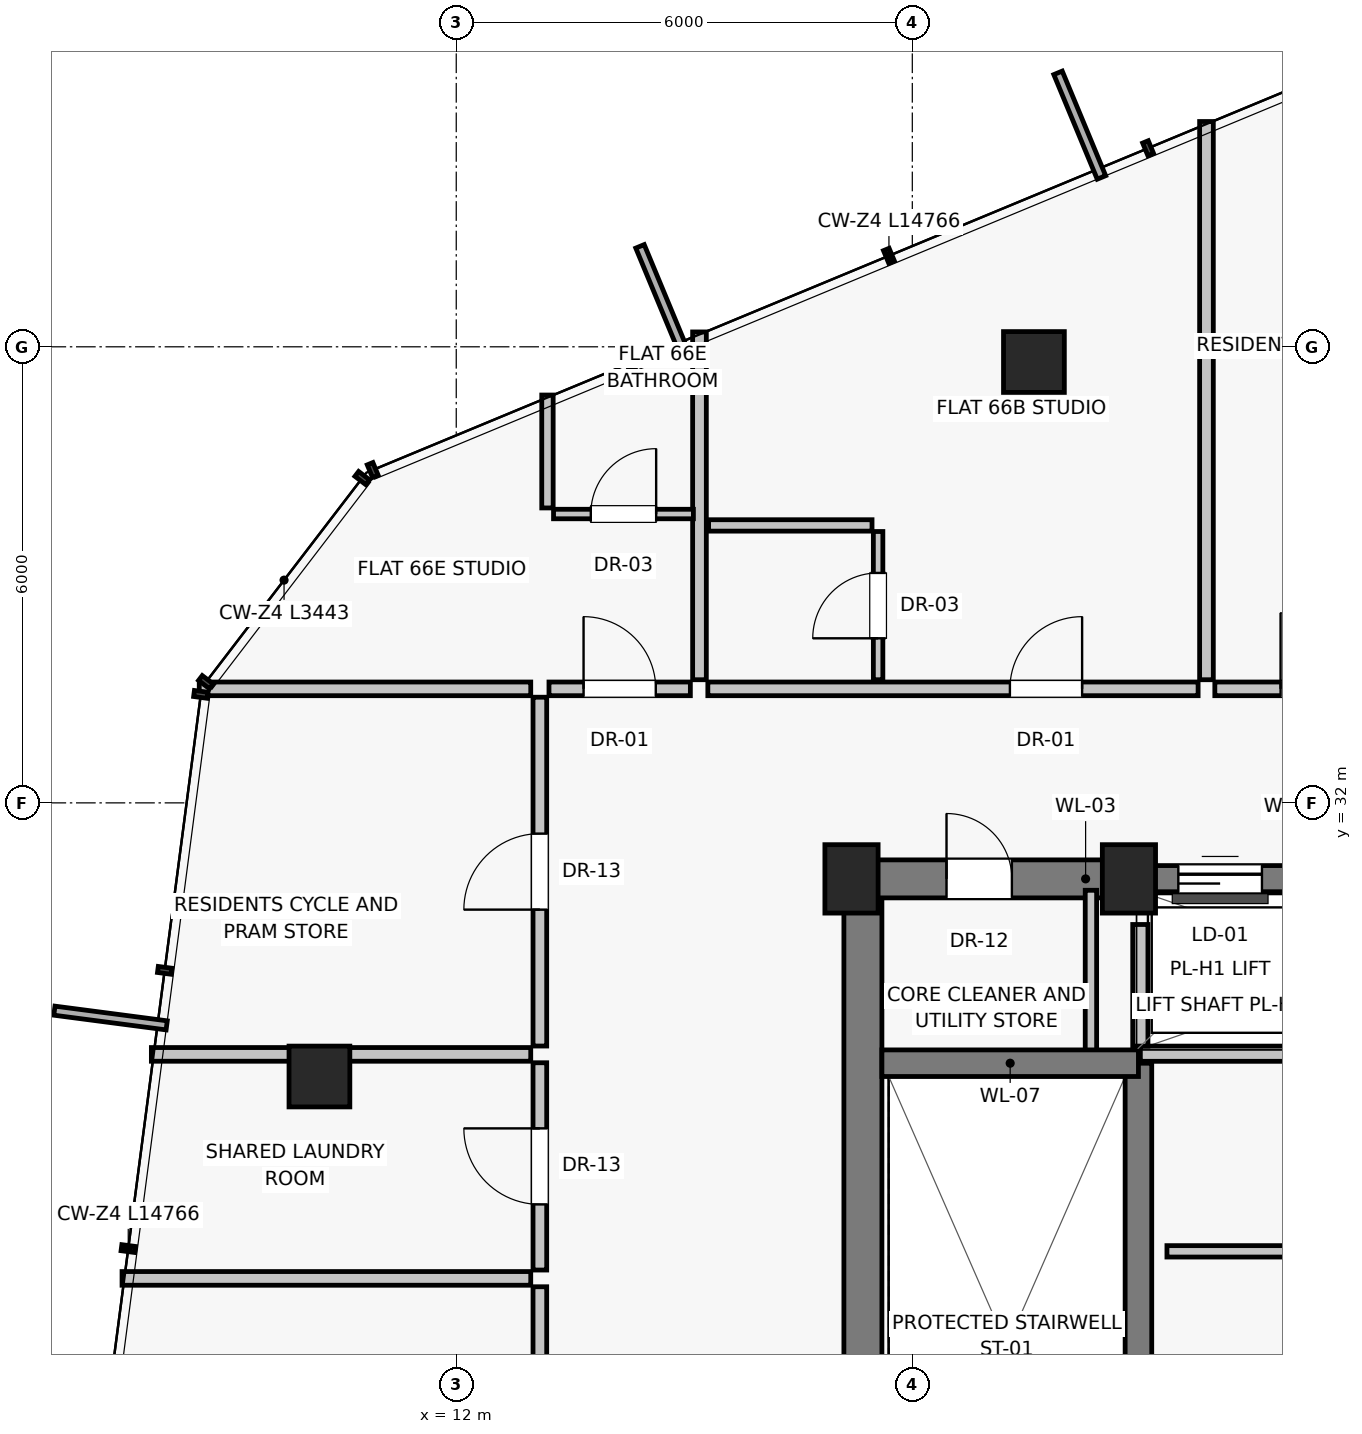
"""IFC4 building model, lengths in metres.
Left out: names, types, materials, properties, quantities, classifications, styles, units other than length and angle.
Written with IfcOpenShell. Run it as: python <this file> out.ifc"""

import sys

from ifc_helpers import new_model, si_unit, direction, frame, frame_2d, origin, origin_2d, place, context, subcontext, project, spatial, rectangle, extrude, source, transform, mapped, element, fill, save


model = new_model("IFC4")
c1 = context("Model", 3, precision=1e-05, world=origin(), true_north=direction((0.0, 1.0)))
c2 = subcontext(c1, "Body", "Model", "MODEL_VIEW")
j1 = project(units=[si_unit("LENGTHUNIT", "METRE"), si_unit("PLANEANGLEUNIT", "RADIAN")], contexts=[c1])
p1 = place(None, origin())
s1 = spatial("IfcSite", under=j1, at=p1, CompositionType="ELEMENT")
p2 = place(p1, origin())
s2 = spatial("IfcBuilding", under=s1, at=p2, CompositionType="ELEMENT")
p3 = place(p2, frame((0.0, 0.0, 233.3)))
s3 = spatial("IfcBuildingStorey", under=s2, at=p3, CompositionType="ELEMENT", Elevation=233.3)
for number, where, z_axis, x_axis in (
    (1, (17.2, 31.0, 0.0), (0.0, 0.0, 1.0), (1.0, 0.0, 0.0)),
    (2, (20.85, 31.0, 0.0), (0.0, 0.0, 1.0), (1.0, 0.0, 0.0)),
):
    element("IfcColumn", number, at=place(p3, frame(where, z_axis=z_axis, x_axis=x_axis)), inside=s3, PredefinedType="PILASTER", context=c2, shape_type="SweptSolid", body=[
        extrude(rectangle(XDim=0.7, YDim=0.9, at=origin_2d()), origin(), (0.0, 0.0, 1.0), 3.25),
    ])
for number, where, z_axis, x_axis in (
    (3, (19.6, 37.8, 0.0), (0.0, 0.0, 1.0), (1.0, 0.0, 0.0)),
    (4, (10.2, 28.4, 0.0), (0.0, 0.0, 1.0), (1.0, 0.0, 0.0)),
):
    element("IfcColumn", number, at=place(p3, frame(where, z_axis=z_axis, x_axis=x_axis)), inside=s3, PredefinedType="COLUMN", context=c2, shape_type="SweptSolid", body=[
        extrude(rectangle(XDim=0.8, YDim=0.8, at=origin_2d()), origin(), (0.0, 0.0, 1.0), 3.25),
    ])
p4 = place(p3, frame((17.35, 16.8, 0.0), z_axis=(0.0, 0.0, 1.0), x_axis=(0.0, 1.0, 0.0)))
e5 = element("IfcWall", 5, at=p4, inside=s3, PredefinedType="SHEAR", context=c2, shape_type="SweptSolid", body=[
    extrude(rectangle(XDim=14.2, YDim=0.5, at=frame_2d((7.1, 0.0))), origin(), (0.0, 0.0, 1.0), 3.015),
])
p5 = place(p3, frame((17.2, 31.0, 0.0), z_axis=(0.0, 0.0, 1.0), x_axis=(1.0, 0.0, 0.0)))
e6 = element("IfcWall", 6, at=p5, inside=s3, PredefinedType="SHEAR", context=c2, shape_type="SweptSolid", body=[
    extrude(rectangle(XDim=3.8, YDim=0.5, at=frame_2d((1.9, 0.0))), origin(), (0.0, 0.0, 1.0), 3.015),
])
p6 = place(p5, frame((1.25, 0.0, 0.0)))
e7 = element("IfcOpeningElement", 7, at=p6, cuts=e6, PredefinedType="OPENING", context=c2, shape_type="SweptSolid", body=[
    extrude(rectangle(XDim=0.86, YDim=2.01, at=frame_2d((0.43, 1.005))), frame((0.0, 0.26, 0.0), z_axis=(0.0, -1.0, 0.0), x_axis=(1.0, 0.0, 0.0)), (0.0, 0.0, 1.0), 0.52),
])
p7 = place(p3, frame((21.0, 31.0, 0.0), z_axis=(0.0, 0.0, 1.0), x_axis=(1.0, 0.0, 0.0)))
e8 = element("IfcWall", 8, at=p7, inside=s3, PredefinedType="SHEAR", context=c2, shape_type="SweptSolid", body=[
    extrude(rectangle(XDim=6.0, YDim=0.35, at=frame_2d((3.0, 0.0))), origin(), (0.0, 0.0, 1.0), 3.015),
])
p8 = place(p7, frame((0.5, 0.0, 0.0)))
e9 = element("IfcOpeningElement", 9, at=p8, cuts=e8, PredefinedType="OPENING", context=c2, shape_type="SweptSolid", body=[
    extrude(rectangle(XDim=1.1, YDim=2.08, at=frame_2d((0.55, 1.04))), frame((0.0, 0.185, 0.0), z_axis=(0.0, -1.0, 0.0), x_axis=(1.0, 0.0, 0.0)), (0.0, 0.0, 1.0), 0.37),
])
p9 = place(p7, frame((2.45, 0.0, 0.0)))
e10 = element("IfcOpeningElement", 10, at=p9, cuts=e8, PredefinedType="OPENING", context=c2, shape_type="SweptSolid", body=[
    extrude(rectangle(XDim=1.1, YDim=2.08, at=frame_2d((0.55, 1.04))), frame((0.0, 0.185, 0.0), z_axis=(0.0, -1.0, 0.0), x_axis=(1.0, 0.0, 0.0)), (0.0, 0.0, 1.0), 0.37),
])
p10 = place(p7, frame((4.4, 0.0, 0.0)))
e11 = element("IfcOpeningElement", 11, at=p10, cuts=e8, PredefinedType="OPENING", context=c2, shape_type="SweptSolid", body=[
    extrude(rectangle(XDim=1.1, YDim=2.08, at=frame_2d((0.55, 1.04))), frame((0.0, 0.185, 0.0), z_axis=(0.0, -1.0, 0.0), x_axis=(1.0, 0.0, 0.0)), (0.0, 0.0, 1.0), 0.37),
])
p11 = place(p3, frame((20.35, 28.65, 0.0), z_axis=(0.0, 0.0, 1.0), x_axis=(0.0, 1.0, 0.0)))
e12 = element("IfcWall", 12, at=p11, inside=s3, PredefinedType="PARTITIONING", context=c2, shape_type="SweptSolid", body=[
    extrude(rectangle(XDim=2.2, YDim=0.15, at=frame_2d((1.1, 0.0))), origin(), (0.0, 0.0, 1.0), 3.015),
])
p12 = place(p3, frame((20.975, 19.8, 0.0), z_axis=(0.0, 0.0, 1.0), x_axis=(0.0, 1.0, 0.0)))
e13 = element("IfcWall", 13, at=p12, inside=s3, PredefinedType="SHEAR", context=c2, shape_type="SweptSolid", body=[
    extrude(rectangle(XDim=8.775, YDim=0.35, at=frame_2d((4.387, 0.0))), origin(), (0.0, 0.0, 1.0), 3.015),
])
p13 = place(p3, frame((17.6, 28.575, 0.0), z_axis=(0.0, 0.0, 1.0), x_axis=(1.0, 0.0, 0.0)))
e14 = element("IfcWall", 14, at=p13, inside=s3, PredefinedType="SHEAR", context=c2, shape_type="SweptSolid", body=[
    extrude(rectangle(XDim=3.375, YDim=0.35, at=frame_2d((1.688, 0.0))), origin(), (0.0, 0.0, 1.0), 3.015),
])
p14 = place(p3, frame((21.0, 28.7, 0.0), z_axis=(0.0, 0.0, 1.0), x_axis=(1.0, 0.0, 0.0)))
e15 = element("IfcWall", 15, at=p14, inside=s3, PredefinedType="SOLIDWALL", context=c2, shape_type="SweptSolid", body=[
    extrude(rectangle(XDim=6.0, YDim=0.2, at=frame_2d((3.0, 0.0))), origin(), (0.0, 0.0, 1.0), 3.015),
])
p15 = place(p3, frame((21.0, 28.8, 0.0), z_axis=(0.0, 0.0, 1.0), x_axis=(0.0, 1.0, 0.0)))
e16 = element("IfcWall", 16, at=p15, inside=s3, PredefinedType="SOLIDWALL", context=c2, shape_type="SweptSolid", body=[
    extrude(rectangle(XDim=1.6, YDim=0.2, at=frame_2d((0.8, 0.0))), origin(), (0.0, 0.0, 1.0), 3.015),
])
p16 = place(p3, frame((21.35, 26.1, 0.0), z_axis=(0.0, 0.0, 1.0), x_axis=(1.0, 0.0, 0.0)))
e17 = element("IfcWall", 17, at=p16, inside=s3, PredefinedType="PARTITIONING", context=c2, shape_type="SweptSolid", body=[
    extrude(rectangle(XDim=5.3, YDim=0.15, at=frame_2d((2.65, 0.0))), origin(), (0.0, 0.0, 1.0), 3.015),
])
p17 = place(p16, frame((2.2, 0.0, 0.0)))
e18 = element("IfcOpeningElement", 18, at=p17, cuts=e17, PredefinedType="OPENING", context=c2, shape_type="SweptSolid", body=[
    extrude(rectangle(XDim=0.86, YDim=2.01, at=frame_2d((0.43, 1.005))), frame((0.0, 0.085, 0.0), z_axis=(0.0, -1.0, 0.0), x_axis=(1.0, 0.0, 0.0)), (0.0, 0.0, 1.0), 0.17),
])
p18 = place(p3, frame((15.2, 33.62, 0.0), z_axis=(0.0, 0.0, 1.0), x_axis=(0.0, 1.0, 0.0)))
e19 = element("IfcWall", 19, at=p18, inside=s3, PredefinedType="PARTITIONING", context=c2, shape_type="SweptSolid", body=[
    extrude(rectangle(XDim=4.575, YDim=0.18, at=frame_2d((2.288, 0.0))), origin(), (0.0, 0.0, 1.0), 3.015),
])
p19 = place(p3, frame((21.98, 33.5, 0.0), z_axis=(0.0, 0.0, 1.0), x_axis=(1.0, 0.0, 0.0)))
e20 = element("IfcWall", 20, at=p19, inside=s3, PredefinedType="PARTITIONING", context=c2, shape_type="SweptSolid", body=[
    extrude(rectangle(XDim=2.73, YDim=0.18, at=frame_2d((1.365, 0.0))), origin(), (0.0, 0.0, 1.0), 3.015),
])
p20 = place(p19, frame((0.865, 0.0, 0.0)))
e21 = element("IfcOpeningElement", 21, at=p20, cuts=e20, PredefinedType="OPENING", context=c2, shape_type="SweptSolid", body=[
    extrude(rectangle(XDim=1.0, YDim=2.01, at=frame_2d((0.5, 1.005))), frame((0.0, 0.1, 0.0), z_axis=(0.0, -1.0, 0.0), x_axis=(1.0, 0.0, 0.0)), (0.0, 0.0, 1.0), 0.2),
])
p21 = place(p3, frame((21.87, 33.62, 0.0), z_axis=(0.0, 0.0, 1.0), x_axis=(0.0, 1.0, 0.0)))
e22 = element("IfcWall", 22, at=p21, inside=s3, PredefinedType="PARTITIONING", context=c2, shape_type="SweptSolid", body=[
    extrude(rectangle(XDim=7.344, YDim=0.18, at=frame_2d((3.672, 0.0))), origin(), (0.0, 0.0, 1.0), 3.015),
])
p22 = place(p3, frame((15.31, 33.5, 0.0), z_axis=(0.0, 0.0, 1.0), x_axis=(1.0, 0.0, 0.0)))
e23 = element("IfcWall", 23, at=p22, inside=s3, PredefinedType="PARTITIONING", context=c2, shape_type="SweptSolid", body=[
    extrude(rectangle(XDim=6.45, YDim=0.18, at=frame_2d((3.225, 0.0))), origin(), (0.0, 0.0, 1.0), 3.015),
])
p23 = place(p22, frame((3.974, 0.0, 0.0)))
e24 = element("IfcOpeningElement", 24, at=p23, cuts=e23, PredefinedType="OPENING", context=c2, shape_type="SweptSolid", body=[
    extrude(rectangle(XDim=0.95, YDim=2.02, at=frame_2d((0.475, 1.01))), frame((0.0, 0.1, 0.0), z_axis=(0.0, -1.0, 0.0), x_axis=(1.0, 0.0, 0.0)), (0.0, 0.0, 1.0), 0.2),
])
p24 = place(p3, frame((17.55, 33.62, 0.0), z_axis=(0.0, 0.0, 1.0), x_axis=(0.0, 1.0, 0.0)))
e25 = element("IfcWall", 25, at=p24, inside=s3, PredefinedType="PARTITIONING", context=c2, shape_type="SweptSolid", body=[
    extrude(rectangle(XDim=1.95, YDim=0.125, at=frame_2d((0.975, 0.0))), origin(), (0.0, 0.0, 1.0), 3.015),
])
p25 = place(p24, frame((0.545, 0.0, 0.0)))
e26 = element("IfcOpeningElement", 26, at=p25, cuts=e25, PredefinedType="OPENING", context=c2, shape_type="SweptSolid", body=[
    extrude(rectangle(XDim=0.86, YDim=2.01, at=frame_2d((0.43, 1.005))), frame((0.0, 0.073, 0.0), z_axis=(0.0, -1.0, 0.0), x_axis=(1.0, 0.0, 0.0)), (0.0, 0.0, 1.0), 0.145),
])
p26 = place(p3, frame((15.32, 35.65, 0.0), z_axis=(0.0, 0.0, 1.0), x_axis=(1.0, 0.0, 0.0)))
e27 = element("IfcWall", 27, at=p26, inside=s3, PredefinedType="PARTITIONING", context=c2, shape_type="SweptSolid", body=[
    extrude(rectangle(XDim=2.15, YDim=0.15, at=frame_2d((1.075, 0.0))), origin(), (0.0, 0.0, 1.0), 3.015),
])
p27 = place(p3, frame((12.98, 33.5, 0.0), z_axis=(0.0, 0.0, 1.0), x_axis=(-1.0, 0.0, 0.0)))
e28 = element("IfcWall", 28, at=p27, inside=s3, PredefinedType="PARTITIONING", context=c2, shape_type="SweptSolid", body=[
    extrude(rectangle(XDim=4.361, YDim=0.18, at=frame_2d((2.181, 0.0))), origin(), (0.0, 0.0, 1.0), 3.015),
])
p28 = place(p3, frame((13.1, 18.759, 0.0), z_axis=(0.0, 0.0, 1.0), x_axis=(0.0, 1.0, 0.0)))
e29 = element("IfcWall", 29, at=p28, inside=s3, PredefinedType="PARTITIONING", context=c2, shape_type="SweptSolid", body=[
    extrude(rectangle(XDim=6.875, YDim=0.18, at=frame_2d((3.438, 0.0))), origin(), (0.0, 0.0, 1.0), 2.662),
])
p29 = place(p28, frame((2.938, 0.0, 0.0)))
e30 = element("IfcOpeningElement", 30, at=p29, cuts=e29, PredefinedType="OPENING", context=c2, shape_type="SweptSolid", body=[
    extrude(rectangle(XDim=1.0, YDim=2.01, at=frame_2d((0.5, 1.005))), frame((0.0, 0.1, 0.0), z_axis=(0.0, -1.0, 0.0), x_axis=(1.0, 0.0, 0.0)), (0.0, 0.0, 1.0), 0.2),
])
p30 = place(p3, frame((12.98, 25.744, 0.0), z_axis=(0.0, 0.0, 1.0), x_axis=(-1.0, 0.0, 0.0)))
e31 = element("IfcWall", 31, at=p30, inside=s3, PredefinedType="PARTITIONING", context=c2, shape_type="SweptSolid", body=[
    extrude(rectangle(XDim=5.377, YDim=0.18, at=frame_2d((2.688, 0.0))), origin(), (0.0, 0.0, 1.0), 3.015),
])
p31 = place(p3, frame((13.1, 25.854, 0.0), z_axis=(0.0, 0.0, 1.0), x_axis=(0.0, 1.0, 0.0)))
e32 = element("IfcWall", 32, at=p31, inside=s3, PredefinedType="PARTITIONING", context=c2, shape_type="SweptSolid", body=[
    extrude(rectangle(XDim=2.727, YDim=0.18, at=frame_2d((1.364, 0.0))), origin(), (0.0, 0.0, 1.0), 2.662),
])
p32 = place(p31, frame((0.864, 0.0, 0.0)))
e33 = element("IfcOpeningElement", 33, at=p32, cuts=e32, PredefinedType="OPENING", context=c2, shape_type="SweptSolid", body=[
    extrude(rectangle(XDim=1.0, YDim=2.01, at=frame_2d((0.5, 1.005))), frame((0.0, 0.1, 0.0), z_axis=(0.0, -1.0, 0.0), x_axis=(1.0, 0.0, 0.0)), (0.0, 0.0, 1.0), 0.2),
])
p33 = place(p3, frame((13.1, 28.801, 0.0), z_axis=(0.0, 0.0, 1.0), x_axis=(0.0, 1.0, 0.0)))
e34 = element("IfcWall", 34, at=p33, inside=s3, PredefinedType="PARTITIONING", context=c2, shape_type="SweptSolid", body=[
    extrude(rectangle(XDim=4.589, YDim=0.18, at=frame_2d((2.294, 0.0))), origin(), (0.0, 0.0, 1.0), 2.662),
])
p34 = place(p33, frame((1.794, 0.0, 0.0)))
e35 = element("IfcOpeningElement", 35, at=p34, cuts=e34, PredefinedType="OPENING", context=c2, shape_type="SweptSolid", body=[
    extrude(rectangle(XDim=1.0, YDim=2.01, at=frame_2d((0.5, 1.005))), frame((0.0, 0.1, 0.0), z_axis=(0.0, -1.0, 0.0), x_axis=(1.0, 0.0, 0.0)), (0.0, 0.0, 1.0), 0.2),
])
p35 = place(p3, frame((12.98, 28.691, 0.0), z_axis=(0.0, 0.0, 1.0), x_axis=(-1.0, 0.0, 0.0)))
e36 = element("IfcWall", 36, at=p35, inside=s3, PredefinedType="PARTITIONING", context=c2, shape_type="SweptSolid", body=[
    extrude(rectangle(XDim=4.991, YDim=0.18, at=frame_2d((2.496, 0.0))), origin(), (0.0, 0.0, 1.0), 3.015),
])
p36 = place(p3, frame((13.22, 33.5, 0.0), z_axis=(0.0, 0.0, 1.0), x_axis=(1.0, 0.0, 0.0)))
e37 = element("IfcWall", 37, at=p36, inside=s3, PredefinedType="PARTITIONING", context=c2, shape_type="SweptSolid", body=[
    extrude(rectangle(XDim=1.86, YDim=0.18, at=frame_2d((0.93, 0.0))), origin(), (0.0, 0.0, 1.0), 3.015),
])
p37 = place(p36, frame((0.455, 0.0, 0.0)))
e38 = element("IfcOpeningElement", 38, at=p37, cuts=e37, PredefinedType="OPENING", context=c2, shape_type="SweptSolid", body=[
    extrude(rectangle(XDim=0.95, YDim=2.02, at=frame_2d((0.475, 1.01))), frame((0.0, 0.1, 0.0), z_axis=(0.0, -1.0, 0.0), x_axis=(1.0, 0.0, 0.0)), (0.0, 0.0, 1.0), 0.2),
])
p38 = place(p3, frame((13.28, 35.8, 0.0), z_axis=(0.0, 0.0, 1.0), x_axis=(1.0, 0.0, 0.0)))
e39 = element("IfcWall", 39, at=p38, inside=s3, PredefinedType="PARTITIONING", context=c2, shape_type="SweptSolid", body=[
    extrude(rectangle(XDim=1.84, YDim=0.125, at=frame_2d((0.92, 0.0))), origin(), (0.0, 0.0, 1.0), 3.015),
])
p39 = place(p38, frame((0.49, 0.0, 0.0)))
e40 = element("IfcOpeningElement", 40, at=p39, cuts=e39, PredefinedType="OPENING", context=c2, shape_type="SweptSolid", body=[
    extrude(rectangle(XDim=0.86, YDim=2.01, at=frame_2d((0.43, 1.005))), frame((0.0, 0.073, 0.0), z_axis=(0.0, -1.0, 0.0), x_axis=(1.0, 0.0, 0.0)), (0.0, 0.0, 1.0), 0.145),
])
p40 = place(p3, frame((13.2, 35.88, 0.0), z_axis=(0.0, 0.0, 1.0), x_axis=(0.0, 1.0, 0.0)))
e41 = element("IfcWall", 41, at=p40, inside=s3, PredefinedType="PARTITIONING", context=c2, shape_type="SweptSolid", body=[
    extrude(rectangle(XDim=1.486, YDim=0.15, at=frame_2d((0.743, 0.0))), origin(), (0.0, 0.0, 1.0), 3.015),
])
m1 = source(origin(), c2, "Body", "SweptSolid", [
    extrude(rectangle(XDim=0.86, YDim=2.01, at=frame_2d((0.43, 1.005))), frame((0.0, 0.025, 0.0), z_axis=(0.0, -1.0, 0.0), x_axis=(1.0, 0.0, 0.0)), (0.0, 0.0, 1.0), 0.05),
])
p41 = place(p6, origin())
e42 = element("IfcDoor", 42, at=p41, inside=s3, OperationType="SINGLE_SWING_LEFT", PredefinedType="DOOR", context=c2, shape_type="MappedRepresentation", body=[
    mapped(m1, transform((0.0, 0.0, 0.0), scale=1.0)),
])
fill(e7, e42)
m2 = source(origin(), c2, "Body", "SweptSolid", [
    extrude(rectangle(XDim=1.1, YDim=2.08, at=frame_2d((0.55, 1.04))), frame((0.0, 0.025, 0.0), z_axis=(0.0, -1.0, 0.0), x_axis=(1.0, 0.0, 0.0)), (0.0, 0.0, 1.0), 0.05),
])
p42 = place(p8, origin())
e43 = element("IfcDoor", 43, at=p42, inside=s3, OperationType="SLIDING_TO_LEFT", PredefinedType="DOOR", context=c2, shape_type="MappedRepresentation", body=[
    mapped(m2, transform((0.0, 0.0, 0.0), scale=1.0)),
])
fill(e9, e43)
m3 = source(origin(), c2, "Body", "SweptSolid", [
    extrude(rectangle(XDim=1.0, YDim=2.01, at=frame_2d((0.5, 1.005))), frame((0.0, 0.025, 0.0), z_axis=(0.0, -1.0, 0.0), x_axis=(1.0, 0.0, 0.0)), (0.0, 0.0, 1.0), 0.05),
])
p43 = place(p20, origin())
e44 = element("IfcDoor", 44, at=p43, inside=s3, OperationType="SINGLE_SWING_LEFT", PredefinedType="DOOR", context=c2, shape_type="MappedRepresentation", body=[
    mapped(m3, transform((0.0, 0.0, 0.0), scale=1.0)),
])
fill(e21, e44)
m4 = source(origin(), c2, "Body", "SweptSolid", [
    extrude(rectangle(XDim=0.95, YDim=2.02, at=frame_2d((0.475, 1.01))), frame((0.0, 0.025, 0.0), z_axis=(0.0, -1.0, 0.0), x_axis=(1.0, 0.0, 0.0)), (0.0, 0.0, 1.0), 0.05),
])
p44 = place(p23, origin())
e45 = element("IfcDoor", 45, at=p44, inside=s3, OperationType="SINGLE_SWING_RIGHT", PredefinedType="DOOR", context=c2, shape_type="MappedRepresentation", body=[
    mapped(m4, transform((0.0, 0.0, 0.0), scale=1.0)),
])
fill(e24, e45)
p45 = place(p25, origin())
e46 = element("IfcDoor", 46, at=p45, inside=s3, OperationType="SINGLE_SWING_LEFT", PredefinedType="DOOR", context=c2, shape_type="MappedRepresentation", body=[
    mapped(m1, transform((0.0, 0.0, 0.0), scale=1.0)),
])
fill(e26, e46)
p46 = place(p32, origin())
e47 = element("IfcDoor", 47, at=p46, inside=s3, OperationType="SINGLE_SWING_RIGHT", PredefinedType="DOOR", context=c2, shape_type="MappedRepresentation", body=[
    mapped(m3, transform((0.0, 0.0, 0.0), scale=1.0)),
])
fill(e33, e47)
p47 = place(p34, origin())
e48 = element("IfcDoor", 48, at=p47, inside=s3, OperationType="SINGLE_SWING_LEFT", PredefinedType="DOOR", context=c2, shape_type="MappedRepresentation", body=[
    mapped(m3, transform((0.0, 0.0, 0.0), scale=1.0)),
])
fill(e35, e48)
p48 = place(p37, origin())
e49 = element("IfcDoor", 49, at=p48, inside=s3, OperationType="SINGLE_SWING_LEFT", PredefinedType="DOOR", context=c2, shape_type="MappedRepresentation", body=[
    mapped(m4, transform((0.0, 0.0, 0.0), scale=1.0)),
])
fill(e38, e49)
p49 = place(p39, origin())
e50 = element("IfcDoor", 50, at=p49, inside=s3, OperationType="SINGLE_SWING_RIGHT", PredefinedType="DOOR", context=c2, shape_type="MappedRepresentation", body=[
    mapped(m1, transform((0.0, 0.0, 0.0), scale=1.0)),
])
fill(e40, e50)
save(model, sys.argv[1])
